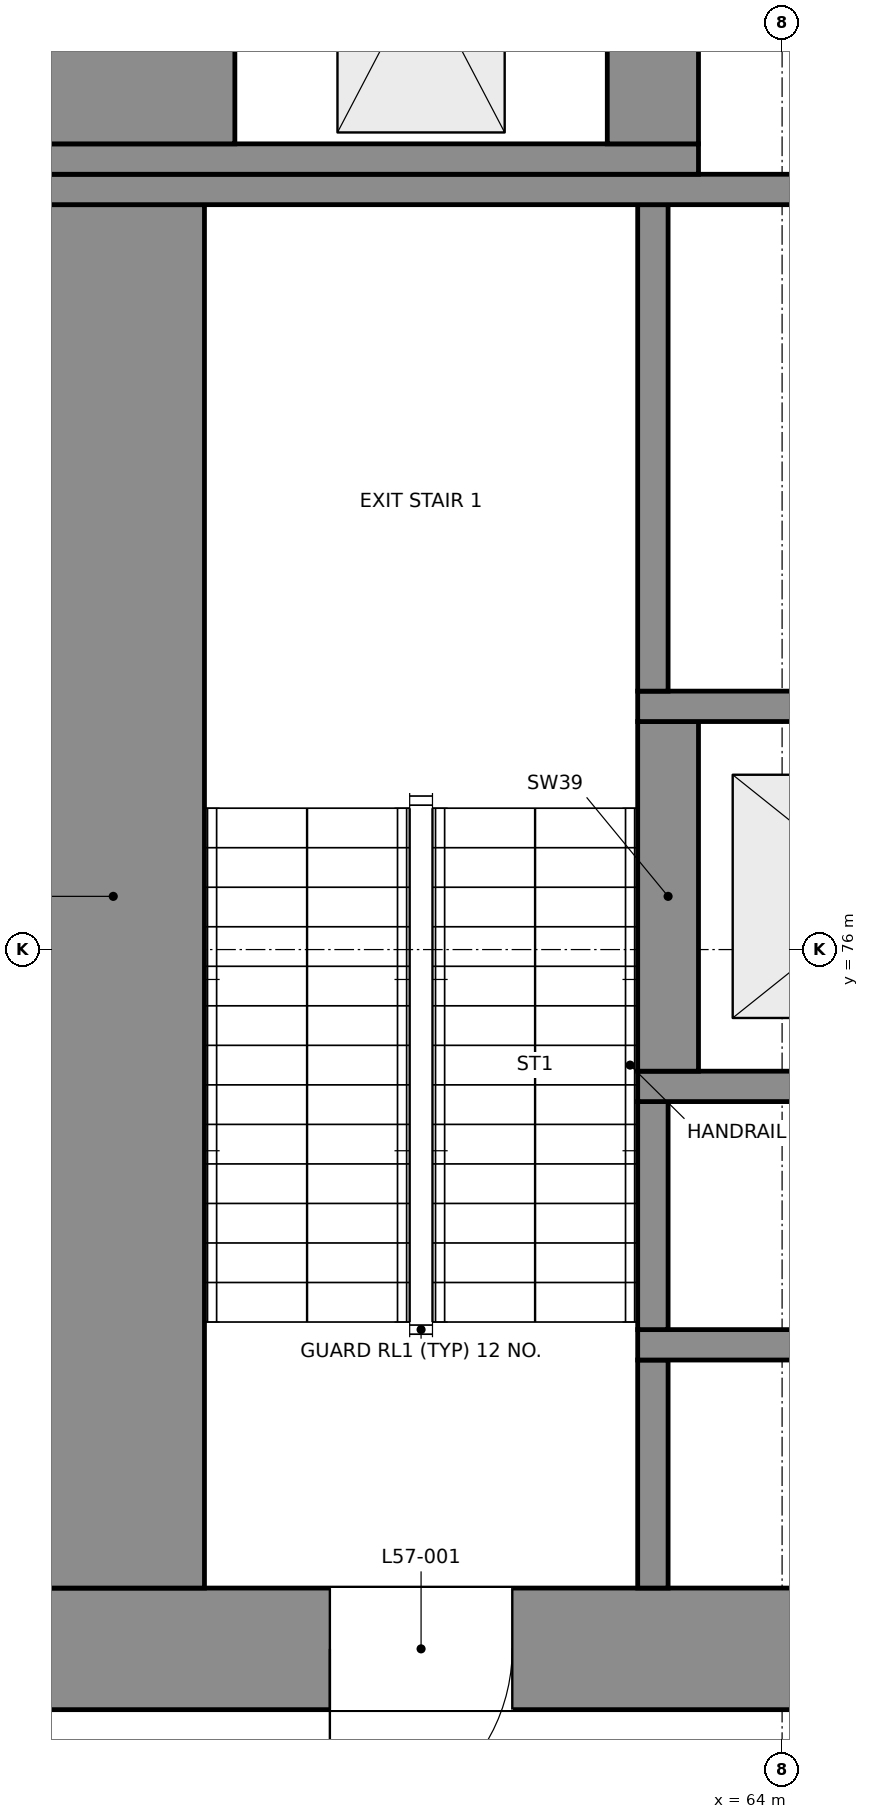
"""IFC4 building model, lengths in metres.
Left out: names, types, materials, properties, quantities, classifications, styles, units other than length and angle.
Written with IfcOpenShell. Run it as: python <this file> out.ifc"""

import sys

from ifc_helpers import new_model, si_unit, direction, frame, frame_2d, origin, place, context, subcontext, project, spatial, rectangle, extrude, element, fill, save


model = new_model("IFC4")
c1 = context("Model", 3, precision=1e-05, world=origin(), true_north=direction((0.0, 1.0)))
c2 = subcontext(c1, "Body", "Model", "MODEL_VIEW")
j1 = project(units=[si_unit("LENGTHUNIT", "METRE"), si_unit("PLANEANGLEUNIT", "RADIAN")], contexts=[c1])
p1 = place(None, origin())
s1 = spatial("IfcSite", under=j1, at=p1, CompositionType="ELEMENT")
p2 = place(p1, origin())
s2 = spatial("IfcBuilding", under=s1, at=p2, CompositionType="ELEMENT")
p3 = place(p2, frame((0.0, 0.0, 243.3)))
s3 = spatial("IfcBuildingStorey", under=s2, at=p3, CompositionType="ELEMENT", Elevation=243.3)
p4 = place(p3, frame((59.0, 71.4, 0.0), z_axis=(0.0, 0.0, 1.0), x_axis=(1.0, 0.0, 0.0)))
e1 = element("IfcWall", 1, at=p4, inside=s3, PredefinedType="SHEAR", context=c2, shape_type="SweptSolid", body=[
    extrude(rectangle(XDim=22.0, YDim=0.8, at=frame_2d((11.0, 0.0))), origin(), (0.0, 0.0, 1.0), 5.0),
])
p5 = place(p4, frame((2.025, 0.0, 0.0)))
e2 = element("IfcOpeningElement", 2, at=p5, cuts=e1, PredefinedType="OPENING", context=c2, shape_type="SweptSolid", body=[
    extrude(rectangle(XDim=1.2, YDim=2.1, at=frame_2d((0.6, 1.05))), frame((0.0, 0.41, 0.0), z_axis=(0.0, -1.0, 0.0), x_axis=(1.0, 0.0, 0.0)), (0.0, 0.0, 1.0), 0.82),
])
p6 = place(p4, frame((18.775, 0.0, 0.0)))
e3 = element("IfcOpeningElement", 3, at=p6, cuts=e1, PredefinedType="OPENING", context=c2, shape_type="SweptSolid", body=[
    extrude(rectangle(XDim=1.2, YDim=2.1, at=frame_2d((0.6, 1.05))), frame((0.0, 0.41, 0.0), z_axis=(0.0, -1.0, 0.0), x_axis=(1.0, 0.0, 0.0)), (0.0, 0.0, 1.0), 0.82),
])
p7 = place(p4, frame((10.0, 0.0, 0.0)))
e4 = element("IfcOpeningElement", 4, at=p7, cuts=e1, PredefinedType="OPENING", context=c2, shape_type="SweptSolid", body=[
    extrude(rectangle(XDim=2.0, YDim=2.1, at=frame_2d((1.0, 1.05))), frame((0.0, 0.41, 0.0), z_axis=(0.0, -1.0, 0.0), x_axis=(1.0, 0.0, 0.0)), (0.0, 0.0, 1.0), 0.82),
])
p8 = place(p3, frame((59.6, 71.8, 0.0), z_axis=(0.0, 0.0, 1.0), x_axis=(0.0, 1.0, 0.0)))
e5 = element("IfcWall", 5, at=p8, inside=s3, PredefinedType="SHEAR", context=c2, shape_type="SweptSolid", body=[
    extrude(rectangle(XDim=9.1, YDim=1.2, at=frame_2d((4.55, 0.0))), origin(), (0.0, 0.0, 1.0), 5.0),
])
p9 = place(p3, frame((63.15, 71.8, 0.0), z_axis=(0.0, 0.0, 1.0), x_axis=(0.0, 1.0, 0.0)))
e6 = element("IfcWall", 6, at=p9, inside=s3, PredefinedType="SHEAR", context=c2, shape_type="SweptSolid", body=[
    extrude(rectangle(XDim=1.5, YDim=0.2, at=frame_2d((0.75, 0.0))), origin(), (0.0, 0.0, 1.0), 5.0),
])
p10 = place(p3, frame((63.05, 73.4, 0.0), z_axis=(0.0, 0.0, 1.0), x_axis=(1.0, 0.0, 0.0)))
e7 = element("IfcWall", 7, at=p10, inside=s3, PredefinedType="SHEAR", context=c2, shape_type="SweptSolid", body=[
    extrude(rectangle(XDim=5.7, YDim=0.2, at=frame_2d((2.85, 0.0))), origin(), (0.0, 0.0, 1.0), 5.0),
])
p11 = place(p3, frame((63.15, 73.5, 0.0), z_axis=(0.0, 0.0, 1.0), x_axis=(0.0, 1.0, 0.0)))
e8 = element("IfcWall", 8, at=p11, inside=s3, PredefinedType="SHEAR", context=c2, shape_type="SweptSolid", body=[
    extrude(rectangle(XDim=1.5, YDim=0.2, at=frame_2d((0.75, 0.0))), origin(), (0.0, 0.0, 1.0), 5.0),
])
p12 = place(p3, frame((63.05, 75.1, 0.0), z_axis=(0.0, 0.0, 1.0), x_axis=(1.0, 0.0, 0.0)))
e9 = element("IfcWall", 9, at=p12, inside=s3, PredefinedType="SHEAR", context=c2, shape_type="SweptSolid", body=[
    extrude(rectangle(XDim=5.7, YDim=0.2, at=frame_2d((2.85, 0.0))), origin(), (0.0, 0.0, 1.0), 5.0),
])
p13 = place(p3, frame((63.25, 75.2, 0.0), z_axis=(0.0, 0.0, 1.0), x_axis=(0.0, 1.0, 0.0)))
e10 = element("IfcWall", 10, at=p13, inside=s3, PredefinedType="SHEAR", context=c2, shape_type="SweptSolid", body=[
    extrude(rectangle(XDim=2.3, YDim=0.4, at=frame_2d((1.15, 0.0))), origin(), (0.0, 0.0, 1.0), 5.0),
])
p14 = place(p3, frame((63.05, 77.6, 0.0), z_axis=(0.0, 0.0, 1.0), x_axis=(1.0, 0.0, 0.0)))
e11 = element("IfcWall", 11, at=p14, inside=s3, PredefinedType="SHEAR", context=c2, shape_type="SweptSolid", body=[
    extrude(rectangle(XDim=5.7, YDim=0.2, at=frame_2d((2.85, 0.0))), origin(), (0.0, 0.0, 1.0), 5.0),
])
p15 = place(p14, frame((1.075, 0.0, 0.0)))
e12 = element("IfcOpeningElement", 12, at=p15, cuts=e11, PredefinedType="OPENING", context=c2, shape_type="SweptSolid", body=[
    extrude(rectangle(XDim=1.1, YDim=2.1, at=frame_2d((0.55, 1.05))), frame((0.0, 0.11, 0.0), z_axis=(0.0, -1.0, 0.0), x_axis=(1.0, 0.0, 0.0)), (0.0, 0.0, 1.0), 0.22),
])
p16 = place(p14, frame((3.725, 0.0, 0.0)))
e13 = element("IfcOpeningElement", 13, at=p16, cuts=e11, PredefinedType="OPENING", context=c2, shape_type="SweptSolid", body=[
    extrude(rectangle(XDim=1.1, YDim=2.1, at=frame_2d((0.55, 1.05))), frame((0.0, 0.11, 0.0), z_axis=(0.0, -1.0, 0.0), x_axis=(1.0, 0.0, 0.0)), (0.0, 0.0, 1.0), 0.22),
])
p17 = place(p3, frame((63.15, 77.7, 0.0), z_axis=(0.0, 0.0, 1.0), x_axis=(0.0, 1.0, 0.0)))
e14 = element("IfcWall", 14, at=p17, inside=s3, PredefinedType="SHEAR", context=c2, shape_type="SweptSolid", body=[
    extrude(rectangle(XDim=3.2, YDim=0.2, at=frame_2d((1.6, 0.0))), origin(), (0.0, 0.0, 1.0), 5.0),
])
p18 = place(p3, frame((59.0, 81.0, 0.0), z_axis=(0.0, 0.0, 1.0), x_axis=(1.0, 0.0, 0.0)))
e15 = element("IfcWall", 15, at=p18, inside=s3, PredefinedType="SHEAR", context=c2, shape_type="SweptSolid", body=[
    extrude(rectangle(XDim=22.0, YDim=0.2, at=frame_2d((11.0, 0.0))), origin(), (0.0, 0.0, 1.0), 5.0),
])
p19 = place(p18, frame((11.015, 0.0, 0.0)))
e16 = element("IfcOpeningElement", 16, at=p19, cuts=e15, PredefinedType="OPENING", context=c2, shape_type="SweptSolid", body=[
    extrude(rectangle(XDim=0.9, YDim=2.1, at=frame_2d((0.45, 1.05))), frame((0.0, 0.11, 0.0), z_axis=(0.0, -1.0, 0.0), x_axis=(1.0, 0.0, 0.0)), (0.0, 0.0, 1.0), 0.22),
])
p20 = place(p18, frame((13.665, 0.0, 0.0)))
e17 = element("IfcOpeningElement", 17, at=p20, cuts=e15, PredefinedType="OPENING", context=c2, shape_type="SweptSolid", body=[
    extrude(rectangle(XDim=0.9, YDim=2.1, at=frame_2d((0.45, 1.05))), frame((0.0, 0.11, 0.0), z_axis=(0.0, -1.0, 0.0), x_axis=(1.0, 0.0, 0.0)), (0.0, 0.0, 1.0), 0.22),
])
p21 = place(p3, frame((59.0, 81.2, 0.0), z_axis=(0.0, 0.0, 1.0), x_axis=(1.0, 0.0, 0.0)))
e18 = element("IfcWall", 18, at=p21, inside=s3, PredefinedType="SHEAR", context=c2, shape_type="SweptSolid", body=[
    extrude(rectangle(XDim=4.45, YDim=0.2, at=frame_2d((2.225, 0.0))), origin(), (0.0, 0.0, 1.0), 5.0),
])
p22 = place(p3, frame((59.7, 81.3, 0.0), z_axis=(0.0, 0.0, 1.0), x_axis=(0.0, 1.0, 0.0)))
e19 = element("IfcWall", 19, at=p22, inside=s3, PredefinedType="SHEAR", context=c2, shape_type="SweptSolid", body=[
    extrude(rectangle(XDim=2.25, YDim=1.4, at=frame_2d((1.125, 0.0))), origin(), (0.0, 0.0, 1.0), 5.0),
])
p23 = place(p3, frame((63.15, 81.3, 0.0), z_axis=(0.0, 0.0, 1.0), x_axis=(0.0, 1.0, 0.0)))
e20 = element("IfcWall", 20, at=p23, inside=s3, PredefinedType="SHEAR", context=c2, shape_type="SweptSolid", body=[
    extrude(rectangle(XDim=2.25, YDim=0.6, at=frame_2d((1.125, 0.0))), origin(), (0.0, 0.0, 1.0), 5.0),
])
p24 = place(p5, frame((1.2, 0.0, 0.0), z_axis=(0.0, 0.0, 1.0), x_axis=(-1.0, 0.0, 0.0)))
e21 = element("IfcDoor", 21, at=p24, inside=s3, OperationType="SINGLE_SWING_RIGHT", PredefinedType="DOOR", context=c2, shape_type="SweptSolid", body=[
    extrude(rectangle(XDim=1.2, YDim=2.1, at=frame_2d((0.6, 1.05))), frame((0.0, 0.025, 0.0), z_axis=(0.0, -1.0, 0.0), x_axis=(1.0, 0.0, 0.0)), (0.0, 0.0, 1.0), 0.05),
])
fill(e2, e21)
save(model, sys.argv[1])
